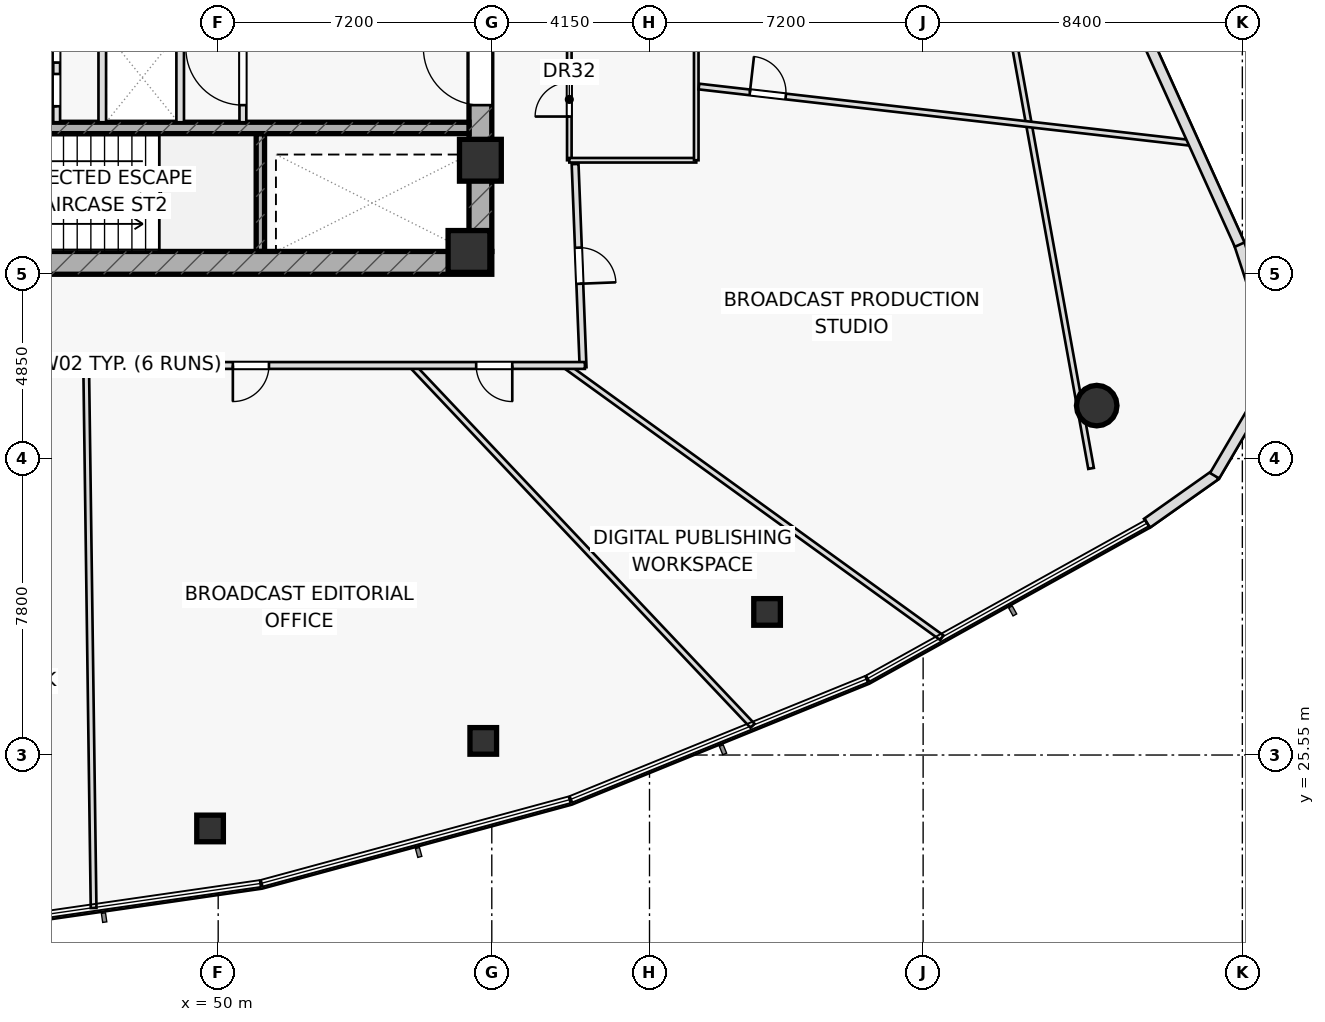
"""IFC4 building model, lengths in metres.
Left out: names, types, materials, properties, quantities, classifications, styles, units other than length and angle.
Written with IfcOpenShell. Run it as: python <this file> out.ifc"""

import sys

from ifc_helpers import new_model, si_unit, direction, frame, frame_2d, origin, origin_2d, place, context, subcontext, project, spatial, rectangle, hollow_rectangle, hollow_circle, extrude, element, fill, save


model = new_model("IFC4")
c1 = context("Model", 3, precision=1e-05, world=origin(), true_north=direction((0.0, 1.0)))
c2 = subcontext(c1, "Body", "Model", "MODEL_VIEW")
j1 = project(units=[si_unit("LENGTHUNIT", "METRE"), si_unit("PLANEANGLEUNIT", "RADIAN")], contexts=[c1])
p1 = place(None, origin())
s1 = spatial("IfcSite", under=j1, at=p1, CompositionType="ELEMENT")
p2 = place(p1, origin())
s2 = spatial("IfcBuilding", under=s1, at=p2, CompositionType="ELEMENT")
p3 = place(p2, frame((0.0, 0.0, 74.4)))
s3 = spatial("IfcBuildingStorey", under=s2, at=p3, CompositionType="ELEMENT", Elevation=74.4)
p4 = place(p3, frame((51.11, 38.8, 0.0), z_axis=(0.0, 0.0, 1.0), x_axis=(0.0, 1.0, 0.0)))
e1 = element("IfcWall", 1, at=p4, inside=s3, PredefinedType="SHEAR", context=c2, shape_type="SweptSolid", body=[
    extrude(rectangle(XDim=3.1, YDim=0.22, at=frame_2d((1.55, 0.0))), origin(), (0.0, 0.0, 1.0), 3.6),
])
p5 = place(p3, frame((42.8, 38.5, 0.0), z_axis=(0.0, 0.0, 1.0), x_axis=(1.0, 0.0, 0.0)))
e2 = element("IfcWall", 2, at=p5, inside=s3, PredefinedType="SHEAR", context=c2, shape_type="SweptSolid", body=[
    extrude(rectangle(XDim=14.4, YDim=0.6, at=frame_2d((7.2, 0.0))), origin(), (0.0, 0.0, 1.0), 3.6),
])
p6 = place(p5, frame((0.88, 0.0, 0.0)))
e3 = element("IfcOpeningElement", 3, at=p6, cuts=e2, PredefinedType="OPENING", context=c2, shape_type="SweptSolid", body=[
    extrude(rectangle(XDim=1.05, YDim=2.2, at=frame_2d((0.525, 1.1))), frame((0.0, 0.31, 0.0), z_axis=(0.0, -1.0, 0.0), x_axis=(1.0, 0.0, 0.0)), (0.0, 0.0, 1.0), 0.62),
])
p7 = place(p3, frame((56.9, 38.8, 0.0), z_axis=(0.0, 0.0, 1.0), x_axis=(0.0, 1.0, 0.0)))
e4 = element("IfcWall", 4, at=p7, inside=s3, PredefinedType="SHEAR", context=c2, shape_type="SweptSolid", body=[
    extrude(rectangle(XDim=12.4, YDim=0.6, at=frame_2d((6.2, 0.0))), origin(), (0.0, 0.0, 1.0), 3.6),
])
p8 = place(p7, frame((3.85, 0.0, 0.0)))
e5 = element("IfcOpeningElement", 5, at=p8, cuts=e4, PredefinedType="OPENING", context=c2, shape_type="SweptSolid", body=[
    extrude(rectangle(XDim=1.5, YDim=2.2, at=frame_2d((0.75, 1.1))), frame((0.0, 0.31, 0.0), z_axis=(0.0, -1.0, 0.0), x_axis=(1.0, 0.0, 0.0)), (0.0, 0.0, 1.0), 0.62),
])
p9 = place(p3, frame((43.4, 42.05, 0.0), z_axis=(0.0, 0.0, 1.0), x_axis=(1.0, 0.0, 0.0)))
e6 = element("IfcWall", 6, at=p9, inside=s3, PredefinedType="SHEAR", context=c2, shape_type="SweptSolid", body=[
    extrude(rectangle(XDim=13.2, YDim=0.3, at=frame_2d((6.6, 0.0))), origin(), (0.0, 0.0, 1.0), 3.6),
])
for number, where, z_axis, x_axis in (
    (7, (56.9, 41.2, 0.0), (0.0, 0.0, 1.0), (1.0, 0.0, 0.0)),
    (8, (56.6, 38.8, 0.0), (0.0, 0.0, 1.0), (1.0, 0.0, 0.0)),
):
    element("IfcColumn", number, at=place(p3, frame(where, z_axis=z_axis, x_axis=x_axis)), inside=s3, PredefinedType="COLUMN", context=c2, shape_type="SweptSolid", body=[
        extrude(rectangle(XDim=1.1, YDim=1.1, at=origin_2d()), origin(), (0.0, 0.0, 1.0), 3.6),
    ])
for number, where, z_axis, x_axis in (
    (9, (49.787, 23.618, 0.0), (0.0, 0.0, 1.0), (1.0, 0.0, 0.0)),
    (10, (56.975, 25.921, 0.0), (0.0, 0.0, 1.0), (1.0, 0.0, 0.0)),
    (11, (64.444, 29.315, 0.0), (0.0, 0.0, 1.0), (1.0, 0.0, 0.0)),
):
    element("IfcColumn", number, at=place(p3, frame(where, z_axis=z_axis, x_axis=x_axis)), inside=s3, PredefinedType="COLUMN", context=c2, shape_type="SweptSolid", body=[
        extrude(hollow_rectangle(XDim=0.7, YDim=0.7, WallThickness=0.04, at=origin_2d()), origin(), (0.0, 0.0, 1.0), 3.6),
    ])
p10 = place(p3, frame((73.118, 34.744, 0.0), z_axis=(0.0, 0.0, 1.0), x_axis=(1.0, 0.0, 0.0)))
e12 = element("IfcColumn", 12, at=p10, inside=s3, PredefinedType="COLUMN", context=c2, shape_type="SweptSolid", body=[
    extrude(hollow_circle(Radius=0.533, WallThickness=0.045, at=origin_2d()), origin(), (0.0, 0.0, 1.0), 3.6),
])
p11 = place(p3, frame((46.95, 42.2, 0.0), z_axis=(0.0, 0.0, 1.0), x_axis=(0.0, 1.0, 0.0)))
e13 = element("IfcWall", 13, at=p11, inside=s3, PredefinedType="PARTITIONING", context=c2, shape_type="SweptSolid", body=[
    extrude(rectangle(XDim=2.4, YDim=0.2, at=frame_2d((1.2, 0.0))), origin(), (0.0, 0.0, 1.0), 3.6),
])
p12 = place(p3, frame((50.65, 42.2, 0.0), z_axis=(0.0, 0.0, 1.0), x_axis=(0.0, 1.0, 0.0)))
e14 = element("IfcWall", 14, at=p12, inside=s3, PredefinedType="PARTITIONING", context=c2, shape_type="SweptSolid", body=[
    extrude(rectangle(XDim=2.85, YDim=0.18, at=frame_2d((1.425, 0.0))), origin(), (0.0, 0.0, 1.0), 3.6),
])
p13 = place(p12, frame((0.45, 0.0, 0.0)))
e15 = element("IfcOpeningElement", 15, at=p13, cuts=e14, PredefinedType="OPENING", context=c2, shape_type="SweptSolid", body=[
    extrude(rectangle(XDim=1.5, YDim=2.2, at=frame_2d((0.75, 1.1))), frame((0.0, 0.1, 0.0), z_axis=(0.0, -1.0, 0.0), x_axis=(1.0, 0.0, 0.0)), (0.0, 0.0, 1.0), 0.2),
])
p14 = place(p3, frame((43.4, 43.55, 0.0), z_axis=(0.0, 0.0, 1.0), x_axis=(1.0, 0.0, 0.0)))
e16 = element("IfcWall", 16, at=p14, inside=s3, PredefinedType="PARTITIONING", context=c2, shape_type="SweptSolid", body=[
    extrude(rectangle(XDim=2.35, YDim=0.15, at=frame_2d((1.175, 0.0))), origin(), (0.0, 0.0, 1.0), 3.6),
])
p15 = place(p3, frame((45.75, 42.2, 0.0), z_axis=(0.0, 0.0, 1.0), x_axis=(0.0, 1.0, 0.0)))
e17 = element("IfcWall", 17, at=p15, inside=s3, PredefinedType="PARTITIONING", context=c2, shape_type="SweptSolid", body=[
    extrude(rectangle(XDim=5.6, YDim=0.18, at=frame_2d((2.8, 0.0))), origin(), (0.0, 0.0, 1.0), 3.6),
])
p16 = place(p15, frame((0.42, 0.0, 0.0)))
e18 = element("IfcOpeningElement", 18, at=p16, cuts=e17, PredefinedType="OPENING", context=c2, shape_type="SweptSolid", body=[
    extrude(rectangle(XDim=0.85, YDim=2.05, at=frame_2d((0.425, 1.025))), frame((0.0, 0.1, 0.0), z_axis=(0.0, -1.0, 0.0), x_axis=(1.0, 0.0, 0.0)), (0.0, 0.0, 1.0), 0.2),
])
p17 = place(p15, frame((1.57, 0.0, 0.0)))
e19 = element("IfcOpeningElement", 19, at=p17, cuts=e17, PredefinedType="OPENING", context=c2, shape_type="SweptSolid", body=[
    extrude(rectangle(XDim=0.85, YDim=2.05, at=frame_2d((0.425, 1.025))), frame((0.0, 0.1, 0.0), z_axis=(0.0, -1.0, 0.0), x_axis=(1.0, 0.0, 0.0)), (0.0, 0.0, 1.0), 0.2),
])
p18 = place(p15, frame((2.8, 0.0, 0.0)))
e20 = element("IfcOpeningElement", 20, at=p18, cuts=e17, PredefinedType="OPENING", context=c2, shape_type="SweptSolid", body=[
    extrude(rectangle(XDim=0.9, YDim=2.05, at=frame_2d((0.45, 1.025))), frame((0.0, 0.1, 0.0), z_axis=(0.0, -1.0, 0.0), x_axis=(1.0, 0.0, 0.0)), (0.0, 0.0, 1.0), 0.2),
])
p19 = place(p3, frame((72.969, 33.091, 0.0), z_axis=(0.0, 0.0, 1.0), x_axis=(-0.177742578179, 0.984077017261, 0.0)))
e21 = element("IfcWall", 21, at=p19, inside=s3, PredefinedType="PARTITIONING", context=c2, shape_type="SweptSolid", body=[
    extrude(rectangle(XDim=13.179, YDim=0.15, at=frame_2d((6.59, 0.0))), origin(), (0.0, 0.0, 1.0), 2.975),
])
p20 = place(p3, frame((59.24, 41.2, 0.0), z_axis=(0.0, 0.0, 1.0), x_axis=(0.0, 1.0, 0.0)))
e22 = element("IfcWall", 22, at=p20, inside=s3, PredefinedType="PARTITIONING", context=c2, shape_type="SweptSolid", body=[
    extrude(rectangle(XDim=7.0, YDim=0.12, at=frame_2d((3.5, 0.0))), origin(), (0.0, 0.0, 1.0), 3.6),
])
p21 = place(p20, frame((1.15, 0.0, 0.0)))
e23 = element("IfcOpeningElement", 23, at=p21, cuts=e22, PredefinedType="OPENING", context=c2, shape_type="SweptSolid", body=[
    extrude(rectangle(XDim=0.9, YDim=2.05, at=frame_2d((0.45, 1.025))), frame((0.0, 0.07, 0.0), z_axis=(0.0, -1.0, 0.0), x_axis=(1.0, 0.0, 0.0)), (0.0, 0.0, 1.0), 0.14),
])
p22 = place(p20, frame((4.7, 0.0, 0.0)))
e24 = element("IfcOpeningElement", 24, at=p22, cuts=e22, PredefinedType="OPENING", context=c2, shape_type="SweptSolid", body=[
    extrude(rectangle(XDim=0.9, YDim=2.05, at=frame_2d((0.45, 1.025))), frame((0.0, 0.07, 0.0), z_axis=(0.0, -1.0, 0.0), x_axis=(1.0, 0.0, 0.0)), (0.0, 0.0, 1.0), 0.14),
])
p23 = place(p3, frame((59.24, 41.2, 0.0), z_axis=(0.0, 0.0, 1.0), x_axis=(1.0, 0.0, 0.0)))
e25 = element("IfcWall", 25, at=p23, inside=s3, PredefinedType="PARTITIONING", context=c2, shape_type="SweptSolid", body=[
    extrude(rectangle(XDim=3.34, YDim=0.12, at=frame_2d((1.67, 0.0))), origin(), (0.0, 0.0, 1.0), 2.975),
])
p24 = place(p3, frame((62.58, 41.2, 0.0), z_axis=(0.0, 0.0, 1.0), x_axis=(0.0, 1.0, 0.0)))
e26 = element("IfcWall", 26, at=p24, inside=s3, PredefinedType="PARTITIONING", context=c2, shape_type="SweptSolid", body=[
    extrude(rectangle(XDim=7.0, YDim=0.12, at=frame_2d((3.5, 0.0))), origin(), (0.0, 0.0, 1.0), 3.6),
])
p25 = place(p3, frame((46.526, 35.8, 0.0), z_axis=(0.0, 0.0, 1.0), x_axis=(0.013697579238, -0.999906183761, 0.0)))
e27 = element("IfcWall", 27, at=p25, inside=s3, PredefinedType="PARTITIONING", context=c2, shape_type="SweptSolid", body=[
    extrude(rectangle(XDim=14.277, YDim=0.15, at=frame_2d((7.138, 0.0))), origin(), (0.0, 0.0, 1.0), 2.975),
])
p26 = place(p3, frame((55.098, 35.8, 0.0), z_axis=(0.0, 0.0, 1.0), x_axis=(0.687014615678, -0.72664359754, 0.0)))
e28 = element("IfcWall", 28, at=p26, inside=s3, PredefinedType="PARTITIONING", context=c2, shape_type="SweptSolid", body=[
    extrude(rectangle(XDim=13.048, YDim=0.15, at=frame_2d((6.524, 0.0))), origin(), (0.0, 0.0, 1.0), 2.975),
])
p27 = place(p3, frame((59.13, 35.8, 0.0), z_axis=(0.0, 0.0, 1.0), x_axis=(0.81049178712, -0.585750000436, 0.0)))
e29 = element("IfcWall", 29, at=p27, inside=s3, PredefinedType="PARTITIONING", context=c2, shape_type="SweptSolid", body=[
    extrude(rectangle(XDim=12.23, YDim=0.15, at=frame_2d((6.115, 0.0))), origin(), (0.0, 0.0, 1.0), 2.975),
])
p28 = place(p3, frame((62.65, 43.139, 0.0), z_axis=(0.0, 0.0, 1.0), x_axis=(0.993507819436, -0.113763846275, 0.0)))
e30 = element("IfcWall", 30, at=p28, inside=s3, PredefinedType="PARTITIONING", context=c2, shape_type="SweptSolid", body=[
    extrude(rectangle(XDim=13.121, YDim=0.15, at=frame_2d((6.561, 0.0))), origin(), (0.0, 0.0, 1.0), 2.975),
])
p29 = place(p28, frame((1.35, 0.0, 0.0)))
e31 = element("IfcOpeningElement", 31, at=p29, cuts=e30, PredefinedType="OPENING", context=c2, shape_type="SweptSolid", body=[
    extrude(rectangle(XDim=0.95, YDim=2.05, at=frame_2d((0.475, 1.025))), frame((0.0, 0.085, 0.0), z_axis=(0.0, -1.0, 0.0), x_axis=(1.0, 0.0, 0.0)), (0.0, 0.0, 1.0), 0.17),
])
p30 = place(p3, frame((59.392, 41.1, 0.0), z_axis=(0.0, 0.0, 1.0), x_axis=(0.03921413315, -0.999230830069, 0.0)))
e32 = element("IfcWall", 32, at=p30, inside=s3, PredefinedType="PARTITIONING", context=c2, shape_type="SweptSolid", body=[
    extrude(rectangle(XDim=5.354, YDim=0.18, at=frame_2d((2.677, 0.0))), origin(), (0.0, 0.0, 1.0), 2.975),
])
p31 = place(p30, frame((2.202, 0.0, 0.0)))
e33 = element("IfcOpeningElement", 33, at=p31, cuts=e32, PredefinedType="OPENING", context=c2, shape_type="SweptSolid", body=[
    extrude(rectangle(XDim=0.95, YDim=2.05, at=frame_2d((0.475, 1.025))), frame((0.0, 0.1, 0.0), z_axis=(0.0, -1.0, 0.0), x_axis=(1.0, 0.0, 0.0)), (0.0, 0.0, 1.0), 0.2),
])
p32 = place(p3, frame((59.65, 35.8, 0.0), z_axis=(0.0, 0.0, 1.0), x_axis=(-1.0, 0.0, 0.0)))
e34 = element("IfcWall", 34, at=p32, inside=s3, PredefinedType="PARTITIONING", context=c2, shape_type="SweptSolid", body=[
    extrude(rectangle(XDim=22.15, YDim=0.18, at=frame_2d((11.075, 0.0))), origin(), (0.0, 0.0, 1.0), 2.975),
])
p33 = place(p32, frame((1.911, 0.0, 0.0)))
e35 = element("IfcOpeningElement", 35, at=p33, cuts=e34, PredefinedType="OPENING", context=c2, shape_type="SweptSolid", body=[
    extrude(rectangle(XDim=0.95, YDim=2.05, at=frame_2d((0.475, 1.025))), frame((0.0, 0.1, 0.0), z_axis=(0.0, -1.0, 0.0), x_axis=(1.0, 0.0, 0.0)), (0.0, 0.0, 1.0), 0.2),
])
p34 = place(p32, frame((8.314, 0.0, 0.0)))
e36 = element("IfcOpeningElement", 36, at=p34, cuts=e34, PredefinedType="OPENING", context=c2, shape_type="SweptSolid", body=[
    extrude(rectangle(XDim=0.95, YDim=2.05, at=frame_2d((0.475, 1.025))), frame((0.0, 0.1, 0.0), z_axis=(0.0, -1.0, 0.0), x_axis=(1.0, 0.0, 0.0)), (0.0, 0.0, 1.0), 0.2),
])
p35 = place(p32, frame((15.147, 0.0, 0.0)))
e37 = element("IfcOpeningElement", 37, at=p35, cuts=e34, PredefinedType="OPENING", context=c2, shape_type="SweptSolid", body=[
    extrude(rectangle(XDim=0.95, YDim=2.05, at=frame_2d((0.475, 1.025))), frame((0.0, 0.1, 0.0), z_axis=(0.0, -1.0, 0.0), x_axis=(1.0, 0.0, 0.0)), (0.0, 0.0, 1.0), 0.2),
])
p36 = place(p32, frame((19.517, 0.0, 0.0)))
e38 = element("IfcOpeningElement", 38, at=p36, cuts=e34, PredefinedType="OPENING", context=c2, shape_type="SweptSolid", body=[
    extrude(rectangle(XDim=0.95, YDim=2.05, at=frame_2d((0.475, 1.025))), frame((0.0, 0.1, 0.0), z_axis=(0.0, -1.0, 0.0), x_axis=(1.0, 0.0, 0.0)), (0.0, 0.0, 1.0), 0.2),
])
p37 = place(p3, frame((74.443, 31.65, 0.0), z_axis=(0.0, 0.0, 1.0), x_axis=(0.81663879443, 0.577149096362, 0.0)))
e39 = element("IfcWall", 39, at=p37, inside=s3, PredefinedType="STANDARD", context=c2, shape_type="SweptSolid", body=[
    extrude(rectangle(XDim=2.201, YDim=0.28, at=frame_2d((1.101, 0.0))), origin(), (0.0, 0.0, 1.0), 3.6),
])
p38 = place(p3, frame((76.22, 32.899, 0.0), z_axis=(0.0, 0.0, 1.0), x_axis=(0.506717947933, 0.86211189601, 0.0)))
e40 = element("IfcWall", 40, at=p38, inside=s3, PredefinedType="STANDARD", context=c2, shape_type="SweptSolid", body=[
    extrude(rectangle(XDim=2.189, YDim=0.28, at=frame_2d((1.095, 0.0))), origin(), (0.0, 0.0, 1.0), 3.6),
])
p39 = place(p3, frame((77.558, 36.906, 0.0), z_axis=(0.0, 0.0, 1.0), x_axis=(-0.311555570037, 0.950227934118, 0.0)))
e41 = element("IfcWall", 41, at=p39, inside=s3, PredefinedType="STANDARD", context=c2, shape_type="SweptSolid", body=[
    extrude(rectangle(XDim=2.212, YDim=0.28, at=frame_2d((1.106, 0.0))), origin(), (0.0, 0.0, 1.0), 3.6),
])
p40 = place(p3, frame((76.88, 38.98, 0.0), z_axis=(0.0, 0.0, 1.0), x_axis=(-0.411879874827, 0.91123815148, 0.0)))
e42 = element("IfcWall", 42, at=p40, inside=s3, PredefinedType="STANDARD", context=c2, shape_type="SweptSolid", body=[
    extrude(rectangle(XDim=8.479, YDim=0.28, at=frame_2d((4.239, 0.0))), origin(), (0.0, 0.0, 1.0), 3.6),
])
p41 = place(p3, frame((49.0, 42.2, 0.0), z_axis=(0.0, 0.0, 1.0), x_axis=(0.0, 1.0, 0.0)))
e43 = element("IfcWall", 43, at=p41, inside=s3, PredefinedType="PARTITIONING", context=c2, shape_type="SweptSolid", body=[
    extrude(rectangle(XDim=2.4, YDim=0.2, at=frame_2d((1.2, 0.0))), origin(), (0.0, 0.0, 1.0), 3.6),
])
p42 = place(p8, origin())
e44 = element("IfcDoor", 44, at=p42, inside=s3, OperationType="SINGLE_SWING_RIGHT", PredefinedType="DOOR", context=c2, shape_type="SweptSolid", body=[
    extrude(rectangle(XDim=1.5, YDim=2.2, at=frame_2d((0.75, 1.1))), frame((0.0, 0.025, 0.0), z_axis=(0.0, -1.0, 0.0), x_axis=(1.0, 0.0, 0.0)), (0.0, 0.0, 1.0), 0.05),
])
fill(e5, e44)
p43 = place(p13, origin())
e45 = element("IfcDoor", 45, at=p43, inside=s3, OperationType="SINGLE_SWING_RIGHT", PredefinedType="DOOR", context=c2, shape_type="SweptSolid", body=[
    extrude(rectangle(XDim=1.5, YDim=2.2, at=frame_2d((0.75, 1.1))), frame((0.0, 0.025, 0.0), z_axis=(0.0, -1.0, 0.0), x_axis=(1.0, 0.0, 0.0)), (0.0, 0.0, 1.0), 0.05),
])
fill(e15, e45)
p44 = place(p16, origin())
e46 = element("IfcDoor", 46, at=p44, inside=s3, OperationType="SINGLE_SWING_LEFT", PredefinedType="DOOR", context=c2, shape_type="SweptSolid", body=[
    extrude(rectangle(XDim=0.85, YDim=2.05, at=frame_2d((0.425, 1.025))), frame((0.0, 0.025, 0.0), z_axis=(0.0, -1.0, 0.0), x_axis=(1.0, 0.0, 0.0)), (0.0, 0.0, 1.0), 0.05),
])
fill(e18, e46)
p45 = place(p17, origin())
e47 = element("IfcDoor", 47, at=p45, inside=s3, OperationType="SINGLE_SWING_RIGHT", PredefinedType="DOOR", context=c2, shape_type="SweptSolid", body=[
    extrude(rectangle(XDim=0.85, YDim=2.05, at=frame_2d((0.425, 1.025))), frame((0.0, 0.025, 0.0), z_axis=(0.0, -1.0, 0.0), x_axis=(1.0, 0.0, 0.0)), (0.0, 0.0, 1.0), 0.05),
])
fill(e19, e47)
p46 = place(p21, origin())
e48 = element("IfcDoor", 48, at=p46, inside=s3, OperationType="SINGLE_SWING_LEFT", PredefinedType="DOOR", context=c2, shape_type="SweptSolid", body=[
    extrude(rectangle(XDim=0.9, YDim=2.05, at=frame_2d((0.45, 1.025))), frame((0.0, 0.025, 0.0), z_axis=(0.0, -1.0, 0.0), x_axis=(1.0, 0.0, 0.0)), (0.0, 0.0, 1.0), 0.05),
])
fill(e23, e48)
p47 = place(p29, origin())
e49 = element("IfcDoor", 49, at=p47, inside=s3, OperationType="SINGLE_SWING_LEFT", PredefinedType="DOOR", context=c2, shape_type="SweptSolid", body=[
    extrude(rectangle(XDim=0.95, YDim=2.05, at=frame_2d((0.475, 1.025))), frame((0.0, 0.025, 0.0), z_axis=(0.0, -1.0, 0.0), x_axis=(1.0, 0.0, 0.0)), (0.0, 0.0, 1.0), 0.05),
])
fill(e31, e49)
p48 = place(p31, origin())
e50 = element("IfcDoor", 50, at=p48, inside=s3, OperationType="SINGLE_SWING_RIGHT", PredefinedType="DOOR", context=c2, shape_type="SweptSolid", body=[
    extrude(rectangle(XDim=0.95, YDim=2.05, at=frame_2d((0.475, 1.025))), frame((0.0, 0.025, 0.0), z_axis=(0.0, -1.0, 0.0), x_axis=(1.0, 0.0, 0.0)), (0.0, 0.0, 1.0), 0.05),
])
fill(e33, e50)
p49 = place(p33, origin())
e51 = element("IfcDoor", 51, at=p49, inside=s3, OperationType="SINGLE_SWING_LEFT", PredefinedType="DOOR", context=c2, shape_type="SweptSolid", body=[
    extrude(rectangle(XDim=0.95, YDim=2.05, at=frame_2d((0.475, 1.025))), frame((0.0, 0.025, 0.0), z_axis=(0.0, -1.0, 0.0), x_axis=(1.0, 0.0, 0.0)), (0.0, 0.0, 1.0), 0.05),
])
fill(e35, e51)
p50 = place(p34, origin())
e52 = element("IfcDoor", 52, at=p50, inside=s3, OperationType="SINGLE_SWING_RIGHT", PredefinedType="DOOR", context=c2, shape_type="SweptSolid", body=[
    extrude(rectangle(XDim=0.95, YDim=2.05, at=frame_2d((0.475, 1.025))), frame((0.0, 0.025, 0.0), z_axis=(0.0, -1.0, 0.0), x_axis=(1.0, 0.0, 0.0)), (0.0, 0.0, 1.0), 0.05),
])
fill(e36, e52)
save(model, sys.argv[1])
